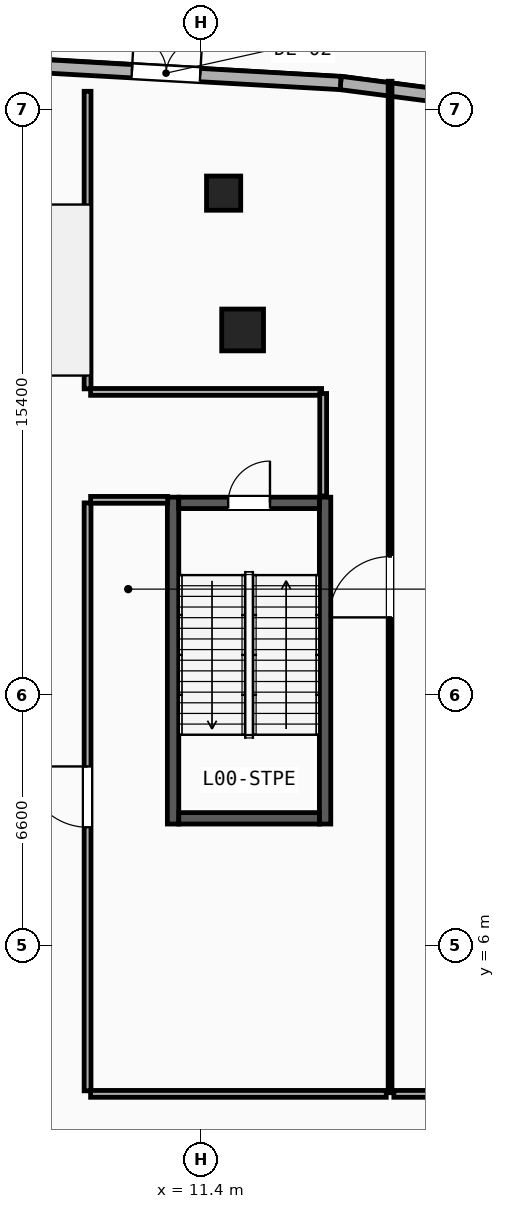
"""IFC4 building model, lengths in metres.
Left out: names, types, materials, properties, quantities, classifications, styles, units other than length and angle.
Written with IfcOpenShell. Run it as: python <this file> out.ifc"""

import sys

from ifc_helpers import new_model, si_unit, direction, frame, frame_2d, origin, origin_2d, place, context, subcontext, project, spatial, rectangle, circle, extrude, element, fill, save


model = new_model("IFC4")
c1 = context("Model", 3, precision=1e-05, world=origin(), true_north=direction((0.0, 1.0)))
c2 = subcontext(c1, "Body", "Model", "MODEL_VIEW")
j1 = project(units=[si_unit("LENGTHUNIT", "METRE"), si_unit("PLANEANGLEUNIT", "RADIAN")], contexts=[c1])
p1 = place(None, origin())
s1 = spatial("IfcSite", under=j1, at=p1, CompositionType="ELEMENT")
p2 = place(p1, origin())
s2 = spatial("IfcBuilding", under=s1, at=p2, CompositionType="ELEMENT")
p3 = place(p2, origin())
s3 = spatial("IfcBuildingStorey", under=s2, at=p3, CompositionType="ELEMENT", Elevation=0.0)
p4 = place(p3, frame((12.5, 22.2, 0.0), z_axis=(0.0, 0.0, 1.0), x_axis=(1.0, 0.0, 0.0)))
e1 = element("IfcColumn", 1, at=p4, inside=s3, PredefinedType="PILASTER", context=c2, shape_type="SweptSolid", body=[
    extrude(circle(Radius=0.55, at=origin_2d()), origin(), (0.0, 0.0, 1.0), 6.0),
])
p5 = place(p3, frame((12.0, 25.8, 0.0), z_axis=(0.0, 0.0, 1.0), x_axis=(1.0, 0.0, 0.0)))
e2 = element("IfcColumn", 2, at=p5, inside=s3, PredefinedType="COLUMN", context=c2, shape_type="SweptSolid", body=[
    extrude(rectangle(XDim=0.9, YDim=0.9, at=origin_2d()), origin(), (0.0, 0.0, 1.0), 5.65),
])
p6 = place(p3, frame((15.079, 28.698, 0.0), z_axis=(0.0, 0.0, 1.0), x_axis=(0.99168663472, -0.128676410104, 0.0)))
e3 = element("IfcWall", 3, at=p6, inside=s3, PredefinedType="SOLIDWALL", context=c2, shape_type="SweptSolid", body=[
    extrude(rectangle(XDim=8.284, YDim=0.35, at=frame_2d((4.142, 0.0))), origin(), (0.0, 0.0, 1.0), 5.65),
])
p7 = place(p3, frame((5.893, 29.216, 0.0), z_axis=(0.0, 0.0, 1.0), x_axis=(0.998413463137, -0.056307695976, 0.0)))
e4 = element("IfcWall", 4, at=p7, inside=s3, PredefinedType="SOLIDWALL", context=c2, shape_type="SweptSolid", body=[
    extrude(rectangle(XDim=9.201, YDim=0.35, at=frame_2d((4.6, 0.0))), origin(), (0.0, 0.0, 1.0), 5.65),
])
p8 = place(p7, frame((3.7, 0.0, 0.0)))
e5 = element("IfcOpeningElement", 5, at=p8, cuts=e4, PredefinedType="OPENING", context=c2, shape_type="SweptSolid", body=[
    extrude(rectangle(XDim=1.8, YDim=2.3, at=frame_2d((0.9, 1.15))), frame((0.0, 0.185, 0.0), z_axis=(0.0, -1.0, 0.0), x_axis=(1.0, 0.0, 0.0)), (0.0, 0.0, 1.0), 0.37),
])
for number, where, z_axis, x_axis in (
    (6, (10.67, 9.2, 0.0), (0.0, 0.0, 1.0), (0.0, 1.0, 0.0)),
    (7, (14.67, 9.2, 0.0), (0.0, 0.0, 1.0), (0.0, 1.0, 0.0)),
):
    element("IfcWall", number, at=place(p3, frame(where, z_axis=z_axis, x_axis=x_axis)), inside=s3, PredefinedType="SHEAR", context=c2, shape_type="SweptSolid", body=[
        extrude(rectangle(XDim=8.6, YDim=0.3, at=frame_2d((4.3, 0.0))), origin(), (0.0, 0.0, 1.0), 5.65),
    ])
p9 = place(p3, frame((10.82, 17.65, 0.0), z_axis=(0.0, 0.0, 1.0), x_axis=(1.0, 0.0, 0.0)))
e8 = element("IfcWall", 8, at=p9, inside=s3, PredefinedType="SHEAR", context=c2, shape_type="SweptSolid", body=[
    extrude(rectangle(XDim=3.7, YDim=0.3, at=frame_2d((1.85, 0.0))), origin(), (0.0, 0.0, 1.0), 5.65),
])
p10 = place(p9, frame((1.3, 0.0, 0.0)))
e9 = element("IfcOpeningElement", 9, at=p10, cuts=e8, PredefinedType="OPENING", context=c2, shape_type="SweptSolid", body=[
    extrude(rectangle(XDim=1.1, YDim=2.15, at=frame_2d((0.55, 1.075))), frame((0.0, 0.16, 0.0), z_axis=(0.0, -1.0, 0.0), x_axis=(1.0, 0.0, 0.0)), (0.0, 0.0, 1.0), 0.32),
])
p11 = place(p3, frame((10.82, 9.35, 0.0), z_axis=(0.0, 0.0, 1.0), x_axis=(1.0, 0.0, 0.0)))
e10 = element("IfcWall", 10, at=p11, inside=s3, PredefinedType="SHEAR", context=c2, shape_type="SweptSolid", body=[
    extrude(rectangle(XDim=3.7, YDim=0.3, at=frame_2d((1.85, 0.0))), origin(), (0.0, 0.0, 1.0), 5.65),
])
p12 = place(p3, frame((8.42, 2.18, 0.0), z_axis=(0.0, 0.0, 1.0), x_axis=(0.0, 1.0, 0.0)))
e11 = element("IfcWall", 11, at=p12, inside=s3, PredefinedType="PARTITIONING", context=c2, shape_type="SweptSolid", body=[
    extrude(rectangle(XDim=15.47, YDim=0.18, at=frame_2d((7.735, 0.0))), origin(), (0.0, 0.0, 1.0), 5.65),
])
p13 = place(p12, frame((6.935, 0.0, 0.0)))
e12 = element("IfcOpeningElement", 12, at=p13, cuts=e11, PredefinedType="OPENING", context=c2, shape_type="SweptSolid", body=[
    extrude(rectangle(XDim=1.6, YDim=2.2, at=frame_2d((0.8, 1.1))), frame((0.0, 0.1, 0.0), z_axis=(0.0, -1.0, 0.0), x_axis=(1.0, 0.0, 0.0)), (0.0, 0.0, 1.0), 0.2),
])
p14 = place(p3, frame((8.42, 20.65, 0.0), z_axis=(0.0, 0.0, 1.0), x_axis=(0.0, 1.0, 0.0)))
e13 = element("IfcWall", 13, at=p14, inside=s3, PredefinedType="PARTITIONING", context=c2, shape_type="SweptSolid", body=[
    extrude(rectangle(XDim=7.83, YDim=0.18, at=frame_2d((3.915, 0.0))), origin(), (0.0, 0.0, 1.0), 5.65),
])
p15 = place(p3, frame((16.28, 2.1, 0.0), z_axis=(0.0, 0.0, 1.0), x_axis=(-1.0, 0.0, 0.0)))
e14 = element("IfcWall", 14, at=p15, inside=s3, PredefinedType="PARTITIONING", context=c2, shape_type="SweptSolid", body=[
    extrude(rectangle(XDim=7.78, YDim=0.18, at=frame_2d((3.89, 0.0))), origin(), (0.0, 0.0, 1.0), 5.65),
])
p16 = place(p3, frame((14.579, 20.57, 0.0), z_axis=(0.0, 0.0, 1.0), x_axis=(-1.0, 0.0, 0.0)))
e15 = element("IfcWall", 15, at=p16, inside=s3, PredefinedType="PARTITIONING", context=c2, shape_type="SweptSolid", body=[
    extrude(rectangle(XDim=6.079, YDim=0.18, at=frame_2d((3.039, 0.0))), origin(), (0.0, 0.0, 1.0), 5.65),
])
p17 = place(p3, frame((14.62, 17.831, 0.0), z_axis=(0.0, 0.0, 1.0), x_axis=(0.0, 1.0, 0.0)))
e16 = element("IfcWall", 16, at=p17, inside=s3, PredefinedType="PARTITIONING", context=c2, shape_type="SweptSolid", body=[
    extrude(rectangle(XDim=2.698, YDim=0.18, at=frame_2d((1.349, 0.0))), origin(), (0.0, 0.0, 1.0), 5.65),
])
p18 = place(p3, frame((8.5, 17.73, 0.0), z_axis=(0.0, 0.0, 1.0), x_axis=(1.0, 0.0, 0.0)))
e17 = element("IfcWall", 17, at=p18, inside=s3, PredefinedType="PARTITIONING", context=c2, shape_type="SweptSolid", body=[
    extrude(rectangle(XDim=2.029, YDim=0.18, at=frame_2d((1.015, 0.0))), origin(), (0.0, 0.0, 1.0), 5.65),
])
p19 = place(p3, frame((35.479, 2.1, 0.0), z_axis=(0.0, 0.0, 1.0), x_axis=(-1.0, 0.0, 0.0)))
e18 = element("IfcWall", 18, at=p19, inside=s3, PredefinedType="PARTITIONING", context=c2, shape_type="SweptSolid", body=[
    extrude(rectangle(XDim=18.999, YDim=0.18, at=frame_2d((9.499, 0.0))), origin(), (0.0, 0.0, 1.0), 5.65),
])
p20 = place(p3, frame((16.38, 2.13, 0.0), z_axis=(0.0, 0.0, 1.0), x_axis=(0.0, 1.0, 0.0)))
e19 = element("IfcWall", 19, at=p20, inside=s3, PredefinedType="PARTITIONING", context=c2, shape_type="SweptSolid", body=[
    extrude(rectangle(XDim=26.615, YDim=0.1, at=frame_2d((13.307, 0.0))), origin(), (0.0, 0.0, 1.0), 5.65),
])
p21 = place(p20, frame((12.507, 0.0, 0.0)))
e20 = element("IfcOpeningElement", 20, at=p21, cuts=e19, PredefinedType="OPENING", context=c2, shape_type="SweptSolid", body=[
    extrude(rectangle(XDim=1.6, YDim=2.2, at=frame_2d((0.8, 1.1))), frame((0.0, 0.06, 0.0), z_axis=(0.0, -1.0, 0.0), x_axis=(1.0, 0.0, 0.0)), (0.0, 0.0, 1.0), 0.12),
])
p22 = place(p8, origin())
e21 = element("IfcDoor", 21, at=p22, inside=s3, OperationType="DOUBLE_DOOR_SINGLE_SWING", PredefinedType="DOOR", context=c2, shape_type="SweptSolid", body=[
    extrude(rectangle(XDim=1.8, YDim=2.3, at=frame_2d((0.9, 1.15))), frame((0.0, 0.025, 0.0), z_axis=(0.0, -1.0, 0.0), x_axis=(1.0, 0.0, 0.0)), (0.0, 0.0, 1.0), 0.05),
])
fill(e5, e21)
p23 = place(p10, origin())
e22 = element("IfcDoor", 22, at=p23, inside=s3, OperationType="SINGLE_SWING_RIGHT", PredefinedType="DOOR", context=c2, shape_type="SweptSolid", body=[
    extrude(rectangle(XDim=1.1, YDim=2.15, at=frame_2d((0.55, 1.075))), frame((0.0, 0.025, 0.0), z_axis=(0.0, -1.0, 0.0), x_axis=(1.0, 0.0, 0.0)), (0.0, 0.0, 1.0), 0.05),
])
fill(e9, e22)
p24 = place(p21, origin())
e23 = element("IfcDoor", 23, at=p24, inside=s3, OperationType="SINGLE_SWING_LEFT", PredefinedType="DOOR", context=c2, shape_type="SweptSolid", body=[
    extrude(rectangle(XDim=1.6, YDim=2.2, at=frame_2d((0.8, 1.1))), frame((0.0, 0.025, 0.0), z_axis=(0.0, -1.0, 0.0), x_axis=(1.0, 0.0, 0.0)), (0.0, 0.0, 1.0), 0.05),
])
fill(e20, e23)
p25 = place(p13, origin())
e24 = element("IfcDoor", 24, at=p25, inside=s3, OperationType="SINGLE_SWING_RIGHT", PredefinedType="DOOR", context=c2, shape_type="SweptSolid", body=[
    extrude(rectangle(XDim=1.6, YDim=2.2, at=frame_2d((0.8, 1.1))), frame((0.0, 0.025, 0.0), z_axis=(0.0, -1.0, 0.0), x_axis=(1.0, 0.0, 0.0)), (0.0, 0.0, 1.0), 0.05),
])
fill(e12, e24)
save(model, sys.argv[1])
